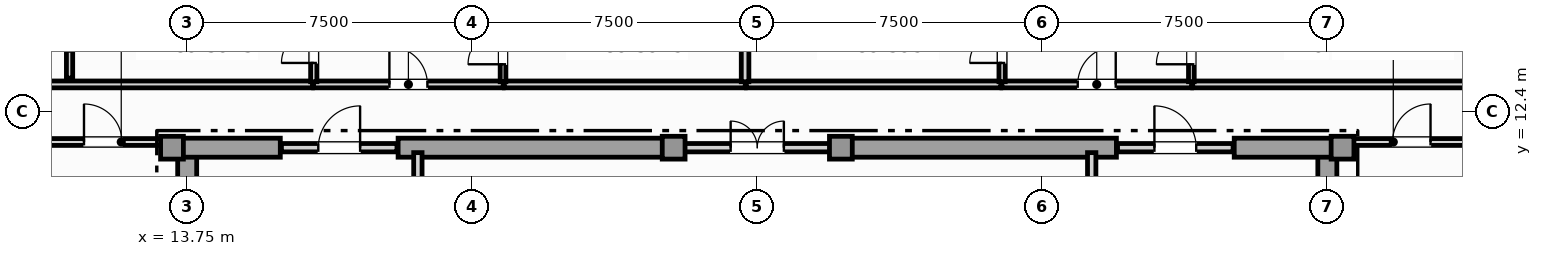
"""IFC4 building model, lengths in metres.
Left out: names, types, materials, properties, quantities, classifications, styles, units other than length and angle.
Written with IfcOpenShell. Run it as: python <this file> out.ifc"""

import sys

from ifc_helpers import new_model, si_unit, direction, frame, frame_2d, origin, origin_2d, place, context, subcontext, project, spatial, rectangle, extrude, element, fill, save


model = new_model("IFC4")
c1 = context("Model", 3, precision=1e-05, world=origin(), true_north=direction((0.0, 1.0)))
c2 = subcontext(c1, "Body", "Model", "MODEL_VIEW")
j1 = project(units=[si_unit("LENGTHUNIT", "METRE"), si_unit("PLANEANGLEUNIT", "RADIAN")], contexts=[c1])
p1 = place(None, origin())
s1 = spatial("IfcSite", under=j1, at=p1, CompositionType="ELEMENT")
p2 = place(p1, origin())
s2 = spatial("IfcBuilding", under=s1, at=p2, CompositionType="ELEMENT")
p3 = place(p2, frame((0.0, 0.0, 362.25)))
s3 = spatial("IfcBuildingStorey", under=s2, at=p3, CompositionType="ELEMENT", Elevation=362.25)
for number, where, z_axis, x_axis in (
    (1, (13.75, 0.92, 0.0), (0.0, 0.0, 1.0), (0.0, 1.0, 0.0)),
    (2, (43.75, 0.92, 0.0), (0.0, 0.0, 1.0), (0.0, 1.0, 0.0)),
):
    element("IfcWall", number, at=place(p3, frame(where, z_axis=z_axis, x_axis=x_axis)), inside=s3, PredefinedType="SHEAR", context=c2, shape_type="SweptSolid", body=[
        extrude(rectangle(XDim=10.53, YDim=0.5, at=frame_2d((5.265, 0.0))), origin(), (0.0, 0.0, 1.0), 4.1),
    ])
p4 = place(p3, frame((13.25, 11.45, 0.0), z_axis=(0.0, 0.0, 1.0), x_axis=(1.0, 0.0, 0.0)))
e3 = element("IfcWall", 3, at=p4, inside=s3, PredefinedType="SHEAR", context=c2, shape_type="SweptSolid", body=[
    extrude(rectangle(XDim=2.95, YDim=0.5, at=frame_2d((1.475, 0.0))), origin(), (0.0, 0.0, 1.0), 4.1),
])
for number, where, z_axis, x_axis in (
    (4, (19.3, 11.45, 0.0), (0.0, 0.0, 1.0), (1.0, 0.0, 0.0)),
    (5, (30.9, 11.45, 0.0), (0.0, 0.0, 1.0), (1.0, 0.0, 0.0)),
):
    element("IfcWall", number, at=place(p3, frame(where, z_axis=z_axis, x_axis=x_axis)), inside=s3, PredefinedType="SHEAR", context=c2, shape_type="SweptSolid", body=[
        extrude(rectangle(XDim=7.3, YDim=0.5, at=frame_2d((3.65, 0.0))), origin(), (0.0, 0.0, 1.0), 4.1),
    ])
p5 = place(p3, frame((41.3, 11.45, 0.0), z_axis=(0.0, 0.0, 1.0), x_axis=(1.0, 0.0, 0.0)))
e6 = element("IfcWall", 6, at=p5, inside=s3, PredefinedType="SHEAR", context=c2, shape_type="SweptSolid", body=[
    extrude(rectangle(XDim=2.95, YDim=0.5, at=frame_2d((1.475, 0.0))), origin(), (0.0, 0.0, 1.0), 4.1),
])
for number, where, z_axis, x_axis in (
    (7, (13.35, 11.45, 0.0), (0.0, 0.0, 1.0), (1.0, 0.0, 0.0)),
    (8, (44.15, 11.45, 0.0), (0.0, 0.0, 1.0), (1.0, 0.0, 0.0)),
    (9, (26.55, 11.45, 0.0), (0.0, 0.0, 1.0), (1.0, 0.0, 0.0)),
    (10, (30.95, 11.45, 0.0), (0.0, 0.0, 1.0), (1.0, 0.0, 0.0)),
):
    element("IfcColumn", number, at=place(p3, frame(where, z_axis=z_axis, x_axis=x_axis)), inside=s3, PredefinedType="COLUMN", context=c2, shape_type="SweptSolid", body=[
        extrude(rectangle(XDim=0.6, YDim=0.6, at=origin_2d()), origin(), (0.0, 0.0, 1.0), 4.4),
    ])
p6 = place(p3, frame((19.82, 8.52, 0.0), z_axis=(0.0, 0.0, 1.0), x_axis=(0.0, 1.0, 0.0)))
e11 = element("IfcWall", 11, at=p6, inside=s3, PredefinedType="SOLIDWALL", context=c2, shape_type="SweptSolid", body=[
    extrude(rectangle(XDim=2.8, YDim=0.22, at=frame_2d((1.4, 0.0))), origin(), (0.0, 0.0, 1.0), 3.555),
])
p7 = place(p6, frame((0.85, 0.0, 0.0)))
e12 = element("IfcOpeningElement", 12, at=p7, cuts=e11, PredefinedType="OPENING", context=c2, shape_type="SweptSolid", body=[
    extrude(rectangle(XDim=1.1, YDim=2.2, at=frame_2d((0.55, 1.1))), frame((0.0, 0.12, 0.0), z_axis=(0.0, -1.0, 0.0), x_axis=(1.0, 0.0, 0.0)), (0.0, 0.0, 1.0), 0.24),
])
p8 = place(p3, frame((37.55, 8.52, 0.0), z_axis=(0.0, 0.0, 1.0), x_axis=(0.0, 1.0, 0.0)))
e13 = element("IfcWall", 13, at=p8, inside=s3, PredefinedType="SOLIDWALL", context=c2, shape_type="SweptSolid", body=[
    extrude(rectangle(XDim=2.8, YDim=0.22, at=frame_2d((1.4, 0.0))), origin(), (0.0, 0.0, 1.0), 3.555),
])
p9 = place(p8, frame((0.85, 0.0, 0.0)))
e14 = element("IfcOpeningElement", 14, at=p9, cuts=e13, PredefinedType="OPENING", context=c2, shape_type="SweptSolid", body=[
    extrude(rectangle(XDim=1.1, YDim=2.2, at=frame_2d((0.55, 1.1))), frame((0.0, 0.12, 0.0), z_axis=(0.0, -1.0, 0.0), x_axis=(1.0, 0.0, 0.0)), (0.0, 0.0, 1.0), 0.24),
])
p10 = place(p3, frame((16.23, 11.45, 0.0), z_axis=(0.0, 0.0, 1.0), x_axis=(1.0, 0.0, 0.0)))
e15 = element("IfcWall", 15, at=p10, inside=s3, PredefinedType="SOLIDWALL", context=c2, shape_type="SweptSolid", body=[
    extrude(rectangle(XDim=3.04, YDim=0.22, at=frame_2d((1.52, 0.0))), origin(), (0.0, 0.0, 1.0), 4.1),
])
p11 = place(p10, frame((0.97, 0.0, 0.0)))
e16 = element("IfcOpeningElement", 16, at=p11, cuts=e15, PredefinedType="OPENING", context=c2, shape_type="SweptSolid", body=[
    extrude(rectangle(XDim=1.1, YDim=2.2, at=frame_2d((0.55, 1.1))), frame((0.0, 0.12, 0.0), z_axis=(0.0, -1.0, 0.0), x_axis=(1.0, 0.0, 0.0)), (0.0, 0.0, 1.0), 0.24),
])
p12 = place(p3, frame((26.63, 11.45, 0.0), z_axis=(0.0, 0.0, 1.0), x_axis=(1.0, 0.0, 0.0)))
e17 = element("IfcWall", 17, at=p12, inside=s3, PredefinedType="SOLIDWALL", context=c2, shape_type="SweptSolid", body=[
    extrude(rectangle(XDim=4.24, YDim=0.22, at=frame_2d((2.12, 0.0))), origin(), (0.0, 0.0, 1.0), 4.1),
])
p13 = place(p12, frame((1.42, 0.0, 0.0)))
e18 = element("IfcOpeningElement", 18, at=p13, cuts=e17, PredefinedType="OPENING", context=c2, shape_type="SweptSolid", body=[
    extrude(rectangle(XDim=1.4, YDim=2.2, at=frame_2d((0.7, 1.1))), frame((0.0, 0.12, 0.0), z_axis=(0.0, -1.0, 0.0), x_axis=(1.0, 0.0, 0.0)), (0.0, 0.0, 1.0), 0.24),
])
p14 = place(p3, frame((38.23, 11.45, 0.0), z_axis=(0.0, 0.0, 1.0), x_axis=(1.0, 0.0, 0.0)))
e19 = element("IfcWall", 19, at=p14, inside=s3, PredefinedType="SOLIDWALL", context=c2, shape_type="SweptSolid", body=[
    extrude(rectangle(XDim=3.04, YDim=0.22, at=frame_2d((1.52, 0.0))), origin(), (0.0, 0.0, 1.0), 4.1),
])
p15 = place(p14, frame((0.97, 0.0, 0.0)))
e20 = element("IfcOpeningElement", 20, at=p15, cuts=e19, PredefinedType="OPENING", context=c2, shape_type="SweptSolid", body=[
    extrude(rectangle(XDim=1.1, YDim=2.2, at=frame_2d((0.55, 1.1))), frame((0.0, 0.12, 0.0), z_axis=(0.0, -1.0, 0.0), x_axis=(1.0, 0.0, 0.0)), (0.0, 0.0, 1.0), 0.24),
])
p16 = place(p3, frame((9.925, 11.6, 0.0), z_axis=(0.0, 0.0, 1.0), x_axis=(1.0, 0.0, 0.0)))
e21 = element("IfcWall", 21, at=p16, inside=s3, PredefinedType="PARTITIONING", context=c2, shape_type="SweptSolid", body=[
    extrude(rectangle(XDim=3.22, YDim=0.18, at=frame_2d((1.61, 0.0))), origin(), (0.0, 0.0, 1.0), 4.1),
])
p17 = place(p16, frame((1.11, 0.0, 0.0)))
e22 = element("IfcOpeningElement", 22, at=p17, cuts=e21, PredefinedType="OPENING", context=c2, shape_type="SweptSolid", body=[
    extrude(rectangle(XDim=1.0, YDim=2.15, at=frame_2d((0.5, 1.075))), frame((0.0, 0.1, 0.0), z_axis=(0.0, -1.0, 0.0), x_axis=(1.0, 0.0, 0.0)), (0.0, 0.0, 1.0), 0.2),
])
p18 = place(p3, frame((44.355, 11.6, 0.0), z_axis=(0.0, 0.0, 1.0), x_axis=(1.0, 0.0, 0.0)))
e23 = element("IfcWall", 23, at=p18, inside=s3, PredefinedType="PARTITIONING", context=c2, shape_type="SweptSolid", body=[
    extrude(rectangle(XDim=3.22, YDim=0.18, at=frame_2d((1.61, 0.0))), origin(), (0.0, 0.0, 1.0), 4.1),
])
p19 = place(p18, frame((1.11, 0.0, 0.0)))
e24 = element("IfcOpeningElement", 24, at=p19, cuts=e23, PredefinedType="OPENING", context=c2, shape_type="SweptSolid", body=[
    extrude(rectangle(XDim=1.0, YDim=2.15, at=frame_2d((0.5, 1.075))), frame((0.0, 0.1, 0.0), z_axis=(0.0, -1.0, 0.0), x_axis=(1.0, 0.0, 0.0)), (0.0, 0.0, 1.0), 0.2),
])
p20 = place(p3, frame((17.076, 13.115, 0.0), z_axis=(0.0, 0.0, 1.0), x_axis=(1.0, 0.0, 0.0)))
e25 = element("IfcWall", 25, at=p20, inside=s3, PredefinedType="PARTITIONING", context=c2, shape_type="SweptSolid", body=[
    extrude(rectangle(XDim=4.99, YDim=0.18, at=frame_2d((2.495, 0.0))), origin(), (0.0, 0.0, 1.0), 4.1),
])
p21 = place(p20, frame((1.995, 0.0, 0.0)))
e26 = element("IfcOpeningElement", 26, at=p21, cuts=e25, PredefinedType="OPENING", context=c2, shape_type="SweptSolid", body=[
    extrude(rectangle(XDim=1.0, YDim=2.15, at=frame_2d((0.5, 1.075))), frame((0.0, 0.1, 0.0), z_axis=(0.0, -1.0, 0.0), x_axis=(1.0, 0.0, 0.0)), (0.0, 0.0, 1.0), 0.2),
])
p22 = place(p3, frame((9.925, 13.115, 0.0), z_axis=(0.0, 0.0, 1.0), x_axis=(1.0, 0.0, 0.0)))
e27 = element("IfcWall", 27, at=p22, inside=s3, PredefinedType="PARTITIONING", context=c2, shape_type="SweptSolid", body=[
    extrude(rectangle(XDim=7.121, YDim=0.18, at=frame_2d((3.561, 0.0))), origin(), (0.0, 0.0, 1.0), 4.1),
])
p23 = place(p3, frame((22.096, 13.115, 0.0), z_axis=(0.0, 0.0, 1.0), x_axis=(1.0, 0.0, 0.0)))
e28 = element("IfcWall", 28, at=p23, inside=s3, PredefinedType="PARTITIONING", context=c2, shape_type="SweptSolid", body=[
    extrude(rectangle(XDim=6.339, YDim=0.18, at=frame_2d((3.169, 0.0))), origin(), (0.0, 0.0, 1.0), 4.1),
])
p24 = place(p3, frame((35.187, 13.115, 0.0), z_axis=(0.0, 0.0, 1.0), x_axis=(1.0, 0.0, 0.0)))
e29 = element("IfcWall", 29, at=p24, inside=s3, PredefinedType="PARTITIONING", context=c2, shape_type="SweptSolid", body=[
    extrude(rectangle(XDim=4.99, YDim=0.18, at=frame_2d((2.495, 0.0))), origin(), (0.0, 0.0, 1.0), 4.1),
])
p25 = place(p24, frame((1.995, 0.0, 0.0)))
e30 = element("IfcOpeningElement", 30, at=p25, cuts=e29, PredefinedType="OPENING", context=c2, shape_type="SweptSolid", body=[
    extrude(rectangle(XDim=1.0, YDim=2.15, at=frame_2d((0.5, 1.075))), frame((0.0, 0.1, 0.0), z_axis=(0.0, -1.0, 0.0), x_axis=(1.0, 0.0, 0.0)), (0.0, 0.0, 1.0), 0.2),
])
p26 = place(p3, frame((28.464, 13.115, 0.0), z_axis=(0.0, 0.0, 1.0), x_axis=(1.0, 0.0, 0.0)))
e31 = element("IfcWall", 31, at=p26, inside=s3, PredefinedType="PARTITIONING", context=c2, shape_type="SweptSolid", body=[
    extrude(rectangle(XDim=6.693, YDim=0.18, at=frame_2d((3.346, 0.0))), origin(), (0.0, 0.0, 1.0), 4.1),
])
p27 = place(p3, frame((40.207, 13.115, 0.0), z_axis=(0.0, 0.0, 1.0), x_axis=(1.0, 0.0, 0.0)))
e32 = element("IfcWall", 32, at=p27, inside=s3, PredefinedType="PARTITIONING", context=c2, shape_type="SweptSolid", body=[
    extrude(rectangle(XDim=7.368, YDim=0.18, at=frame_2d((3.684, 0.0))), origin(), (0.0, 0.0, 1.0), 4.1),
])
p28 = place(p3, frame((17.081, 13.185, 0.0), z_axis=(0.0, 0.0, 1.0), x_axis=(0.0, 1.0, 0.0)))
e33 = element("IfcWall", 33, at=p28, inside=s3, PredefinedType="PLUMBINGWALL", context=c2, shape_type="SweptSolid", body=[
    extrude(rectangle(XDim=1.84, YDim=0.165, at=frame_2d((0.92, 0.0))), origin(), (0.0, 0.0, 1.0), 4.1),
])
p29 = place(p28, frame((0.495, 0.0, 0.0)))
e34 = element("IfcOpeningElement", 34, at=p29, cuts=e33, PredefinedType="OPENING", context=c2, shape_type="SweptSolid", body=[
    extrude(rectangle(XDim=0.85, YDim=2.1, at=frame_2d((0.425, 1.05))), frame((0.0, 0.093, 0.0), z_axis=(0.0, -1.0, 0.0), x_axis=(1.0, 0.0, 0.0)), (0.0, 0.0, 1.0), 0.185),
])
p30 = place(p3, frame((22.061, 13.185, 0.0), z_axis=(0.0, 0.0, 1.0), x_axis=(0.0, 1.0, 0.0)))
e35 = element("IfcWall", 35, at=p30, inside=s3, PredefinedType="PARTITIONING", context=c2, shape_type="SweptSolid", body=[
    extrude(rectangle(XDim=1.84, YDim=0.15, at=frame_2d((0.92, 0.0))), origin(), (0.0, 0.0, 1.0), 4.1),
])
p31 = place(p30, frame((0.46, 0.0, 0.0)))
e36 = element("IfcOpeningElement", 36, at=p31, cuts=e35, PredefinedType="OPENING", context=c2, shape_type="SweptSolid", body=[
    extrude(rectangle(XDim=0.92, YDim=2.1, at=frame_2d((0.46, 1.05))), frame((0.0, 0.085, 0.0), z_axis=(0.0, -1.0, 0.0), x_axis=(1.0, 0.0, 0.0)), (0.0, 0.0, 1.0), 0.17),
])
p32 = place(p3, frame((28.429, 13.185, 0.0), z_axis=(0.0, 0.0, 1.0), x_axis=(0.0, 1.0, 0.0)))
e37 = element("IfcWall", 37, at=p32, inside=s3, PredefinedType="PARTITIONING", context=c2, shape_type="SweptSolid", body=[
    extrude(rectangle(XDim=1.84, YDim=0.2, at=frame_2d((0.92, 0.0))), origin(), (0.0, 0.0, 1.0), 4.1),
])
p33 = place(p3, frame((35.192, 13.185, 0.0), z_axis=(0.0, 0.0, 1.0), x_axis=(0.0, 1.0, 0.0)))
e38 = element("IfcWall", 38, at=p33, inside=s3, PredefinedType="PLUMBINGWALL", context=c2, shape_type="SweptSolid", body=[
    extrude(rectangle(XDim=1.84, YDim=0.165, at=frame_2d((0.92, 0.0))), origin(), (0.0, 0.0, 1.0), 4.1),
])
p34 = place(p33, frame((0.495, 0.0, 0.0)))
e39 = element("IfcOpeningElement", 39, at=p34, cuts=e38, PredefinedType="OPENING", context=c2, shape_type="SweptSolid", body=[
    extrude(rectangle(XDim=0.85, YDim=2.1, at=frame_2d((0.425, 1.05))), frame((0.0, 0.093, 0.0), z_axis=(0.0, -1.0, 0.0), x_axis=(1.0, 0.0, 0.0)), (0.0, 0.0, 1.0), 0.185),
])
p35 = place(p3, frame((40.172, 13.185, 0.0), z_axis=(0.0, 0.0, 1.0), x_axis=(0.0, 1.0, 0.0)))
e40 = element("IfcWall", 40, at=p35, inside=s3, PredefinedType="PARTITIONING", context=c2, shape_type="SweptSolid", body=[
    extrude(rectangle(XDim=1.84, YDim=0.15, at=frame_2d((0.92, 0.0))), origin(), (0.0, 0.0, 1.0), 3.797),
])
p36 = place(p35, frame((0.46, 0.0, 0.0)))
e41 = element("IfcOpeningElement", 41, at=p36, cuts=e40, PredefinedType="OPENING", context=c2, shape_type="SweptSolid", body=[
    extrude(rectangle(XDim=0.92, YDim=2.1, at=frame_2d((0.46, 1.05))), frame((0.0, 0.085, 0.0), z_axis=(0.0, -1.0, 0.0), x_axis=(1.0, 0.0, 0.0)), (0.0, 0.0, 1.0), 0.17),
])
p37 = place(p3, frame((10.655, 13.28, 0.0), z_axis=(0.0, 0.0, 1.0), x_axis=(0.0, 1.0, 0.0)))
e42 = element("IfcWall", 42, at=p37, inside=s3, PredefinedType="PLUMBINGWALL", context=c2, shape_type="SweptSolid", body=[
    extrude(rectangle(XDim=1.575, YDim=0.165, at=frame_2d((0.788, 0.0))), origin(), (0.0, 0.0, 1.0), 4.1),
])
p38 = place(p11, origin())
e43 = element("IfcDoor", 43, at=p38, inside=s3, OperationType="SINGLE_SWING_RIGHT", PredefinedType="DOOR", context=c2, shape_type="SweptSolid", body=[
    extrude(rectangle(XDim=1.1, YDim=2.2, at=frame_2d((0.55, 1.1))), frame((0.0, 0.025, 0.0), z_axis=(0.0, -1.0, 0.0), x_axis=(1.0, 0.0, 0.0)), (0.0, 0.0, 1.0), 0.05),
])
fill(e16, e43)
p39 = place(p13, origin())
e44 = element("IfcDoor", 44, at=p39, inside=s3, OperationType="DOUBLE_DOOR_SINGLE_SWING", PredefinedType="DOOR", context=c2, shape_type="SweptSolid", body=[
    extrude(rectangle(XDim=1.4, YDim=2.2, at=frame_2d((0.7, 1.1))), frame((0.0, 0.025, 0.0), z_axis=(0.0, -1.0, 0.0), x_axis=(1.0, 0.0, 0.0)), (0.0, 0.0, 1.0), 0.05),
])
fill(e18, e44)
p40 = place(p15, origin())
e45 = element("IfcDoor", 45, at=p40, inside=s3, OperationType="SINGLE_SWING_LEFT", PredefinedType="DOOR", context=c2, shape_type="SweptSolid", body=[
    extrude(rectangle(XDim=1.1, YDim=2.2, at=frame_2d((0.55, 1.1))), frame((0.0, 0.025, 0.0), z_axis=(0.0, -1.0, 0.0), x_axis=(1.0, 0.0, 0.0)), (0.0, 0.0, 1.0), 0.05),
])
fill(e20, e45)
p41 = place(p17, origin())
e46 = element("IfcDoor", 46, at=p41, inside=s3, OperationType="SINGLE_SWING_LEFT", PredefinedType="DOOR", context=c2, shape_type="SweptSolid", body=[
    extrude(rectangle(XDim=1.0, YDim=2.15, at=frame_2d((0.5, 1.075))), frame((0.0, 0.025, 0.0), z_axis=(0.0, -1.0, 0.0), x_axis=(1.0, 0.0, 0.0)), (0.0, 0.0, 1.0), 0.05),
])
fill(e22, e46)
p42 = place(p19, origin())
e47 = element("IfcDoor", 47, at=p42, inside=s3, OperationType="SINGLE_SWING_RIGHT", PredefinedType="DOOR", context=c2, shape_type="SweptSolid", body=[
    extrude(rectangle(XDim=1.0, YDim=2.15, at=frame_2d((0.5, 1.075))), frame((0.0, 0.025, 0.0), z_axis=(0.0, -1.0, 0.0), x_axis=(1.0, 0.0, 0.0)), (0.0, 0.0, 1.0), 0.05),
])
fill(e24, e47)
p43 = place(p21, origin())
e48 = element("IfcDoor", 48, at=p43, inside=s3, OperationType="SINGLE_SWING_LEFT", PredefinedType="DOOR", context=c2, shape_type="SweptSolid", body=[
    extrude(rectangle(XDim=1.0, YDim=2.15, at=frame_2d((0.5, 1.075))), frame((0.0, 0.025, 0.0), z_axis=(0.0, -1.0, 0.0), x_axis=(1.0, 0.0, 0.0)), (0.0, 0.0, 1.0), 0.05),
])
fill(e26, e48)
p44 = place(p25, origin())
e49 = element("IfcDoor", 49, at=p44, inside=s3, OperationType="SINGLE_SWING_RIGHT", PredefinedType="DOOR", context=c2, shape_type="SweptSolid", body=[
    extrude(rectangle(XDim=1.0, YDim=2.15, at=frame_2d((0.5, 1.075))), frame((0.0, 0.025, 0.0), z_axis=(0.0, -1.0, 0.0), x_axis=(1.0, 0.0, 0.0)), (0.0, 0.0, 1.0), 0.05),
])
fill(e30, e49)
p45 = place(p29, origin())
e50 = element("IfcDoor", 50, at=p45, inside=s3, OperationType="SINGLE_SWING_LEFT", PredefinedType="DOOR", context=c2, shape_type="SweptSolid", body=[
    extrude(rectangle(XDim=0.85, YDim=2.1, at=frame_2d((0.425, 1.05))), frame((0.0, 0.025, 0.0), z_axis=(0.0, -1.0, 0.0), x_axis=(1.0, 0.0, 0.0)), (0.0, 0.0, 1.0), 0.05),
])
fill(e34, e50)
p46 = place(p31, origin())
e51 = element("IfcDoor", 51, at=p46, inside=s3, OperationType="SINGLE_SWING_LEFT", PredefinedType="DOOR", context=c2, shape_type="SweptSolid", body=[
    extrude(rectangle(XDim=0.92, YDim=2.1, at=frame_2d((0.46, 1.05))), frame((0.0, 0.025, 0.0), z_axis=(0.0, -1.0, 0.0), x_axis=(1.0, 0.0, 0.0)), (0.0, 0.0, 1.0), 0.05),
])
fill(e36, e51)
p47 = place(p34, origin())
e52 = element("IfcDoor", 52, at=p47, inside=s3, OperationType="SINGLE_SWING_LEFT", PredefinedType="DOOR", context=c2, shape_type="SweptSolid", body=[
    extrude(rectangle(XDim=0.85, YDim=2.1, at=frame_2d((0.425, 1.05))), frame((0.0, 0.025, 0.0), z_axis=(0.0, -1.0, 0.0), x_axis=(1.0, 0.0, 0.0)), (0.0, 0.0, 1.0), 0.05),
])
fill(e39, e52)
p48 = place(p36, origin())
e53 = element("IfcDoor", 53, at=p48, inside=s3, OperationType="SINGLE_SWING_LEFT", PredefinedType="DOOR", context=c2, shape_type="SweptSolid", body=[
    extrude(rectangle(XDim=0.92, YDim=2.1, at=frame_2d((0.46, 1.05))), frame((0.0, 0.025, 0.0), z_axis=(0.0, -1.0, 0.0), x_axis=(1.0, 0.0, 0.0)), (0.0, 0.0, 1.0), 0.05),
])
fill(e41, e53)
save(model, sys.argv[1])
